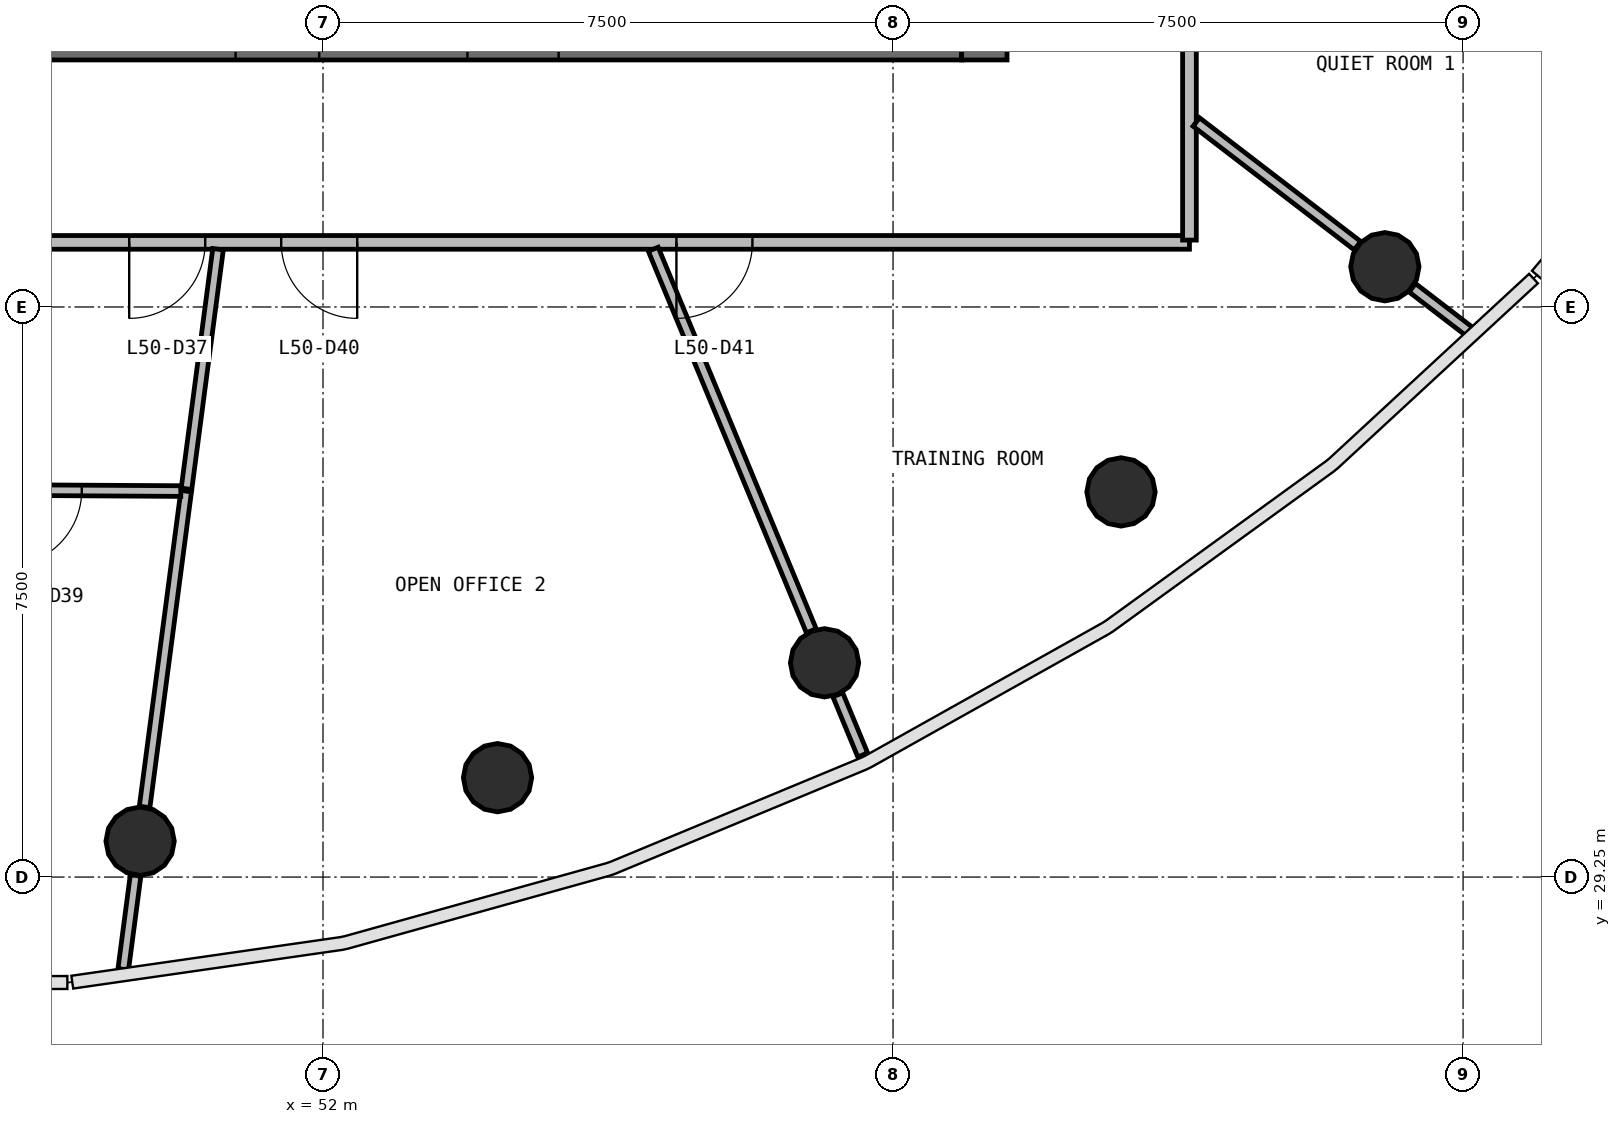
"""IFC4 building model, lengths in metres.
Left out: names, types, materials, properties, quantities, classifications, styles, units other than length and angle.
Written with IfcOpenShell. Run it as: python <this file> out.ifc"""

import sys

from ifc_helpers import new_model, si_unit, direction, frame, frame_2d, origin, origin_2d, place, context, subcontext, project, spatial, rectangle, circle, extrude, source, transform, mapped, element, fill, save


model = new_model("IFC4")
c1 = context("Model", 3, precision=1e-05, world=origin(), true_north=direction((0.0, 1.0)))
c2 = subcontext(c1, "Body", "Model", "MODEL_VIEW")
j1 = project(units=[si_unit("LENGTHUNIT", "METRE"), si_unit("PLANEANGLEUNIT", "RADIAN")], contexts=[c1])
p1 = place(None, origin())
s1 = spatial("IfcSite", under=j1, at=p1, CompositionType="ELEMENT")
p2 = place(p1, origin())
s2 = spatial("IfcBuilding", under=s1, at=p2, CompositionType="ELEMENT")
p3 = place(p2, frame((0.0, 0.0, 207.2)))
s3 = spatial("IfcBuildingStorey", under=s2, at=p3, CompositionType="ELEMENT", Elevation=207.2)
p4 = place(p3, frame((60.7, 40.0, 0.0), z_axis=(0.0, 0.0, 1.0), x_axis=(0.0, 1.0, 0.0)))
e1 = element("IfcWall", 1, at=p4, inside=s3, PredefinedType="SHEAR", context=c2, shape_type="SweptSolid", body=[
    extrude(rectangle(XDim=16.0, YDim=0.6, at=frame_2d((8.0, 0.0))), origin(), (0.0, 0.0, 1.0), 3.9),
])
p5 = place(p4, frame((7.1, 0.0, 0.0)))
e2 = element("IfcOpeningElement", 2, at=p5, cuts=e1, PredefinedType="OPENING", context=c2, shape_type="SweptSolid", body=[
    extrude(rectangle(XDim=1.8, YDim=2.1, at=frame_2d((0.9, 1.05))), frame((0.0, 0.31, 0.0), z_axis=(0.0, -1.0, 0.0), x_axis=(1.0, 0.0, 0.0)), (0.0, 0.0, 1.0), 0.62),
])
p6 = place(p3, frame((43.6, 40.3, 0.0), z_axis=(0.0, 0.0, 1.0), x_axis=(1.0, 0.0, 0.0)))
e3 = element("IfcWall", 3, at=p6, inside=s3, PredefinedType="SHEAR", context=c2, shape_type="SweptSolid", body=[
    extrude(rectangle(XDim=16.8, YDim=0.6, at=frame_2d((8.4, 0.0))), origin(), (0.0, 0.0, 1.0), 3.9),
])
p7 = place(p6, frame((10.3, 0.0, 0.0)))
e4 = element("IfcOpeningElement", 4, at=p7, cuts=e3, PredefinedType="OPENING", context=c2, shape_type="SweptSolid", body=[
    extrude(rectangle(XDim=1.2, YDim=2.1, at=frame_2d((0.6, 1.05))), frame((0.0, 0.31, 0.0), z_axis=(0.0, -1.0, 0.0), x_axis=(1.0, 0.0, 0.0)), (0.0, 0.0, 1.0), 0.62),
])
p8 = place(p6, frame((7.25, 0.0, 0.0)))
e5 = element("IfcOpeningElement", 5, at=p8, cuts=e3, PredefinedType="OPENING", context=c2, shape_type="SweptSolid", body=[
    extrude(rectangle(XDim=1.1, YDim=2.1, at=frame_2d((0.55, 1.05))), frame((0.0, 0.31, 0.0), z_axis=(0.0, -1.0, 0.0), x_axis=(1.0, 0.0, 0.0)), (0.0, 0.0, 1.0), 0.62),
])
p9 = place(p6, frame((0.7, 0.0, 0.0)))
e6 = element("IfcOpeningElement", 6, at=p9, cuts=e3, PredefinedType="OPENING", context=c2, shape_type="SweptSolid", body=[
    extrude(rectangle(XDim=0.8, YDim=2.1, at=frame_2d((0.4, 1.05))), frame((0.0, 0.31, 0.0), z_axis=(0.0, -1.0, 0.0), x_axis=(1.0, 0.0, 0.0)), (0.0, 0.0, 1.0), 0.62),
])
m1 = source(origin(), c2, "Body", "SweptSolid", [
    extrude(circle(Radius=0.45, at=origin_2d()), origin(), (0.0, 0.0, 1.0), 3.9),
])
for number, where, z_axis, x_axis in (
    (7, (49.594, 29.722, 0.0), (0.0, 0.0, 1.0), (1.0, 0.0, 0.0)),
    (8, (54.296, 30.558, 0.0), (0.0, 0.0, 1.0), (1.0, 0.0, 0.0)),
    (9, (58.599, 32.069, 0.0), (0.0, 0.0, 1.0), (1.0, 0.0, 0.0)),
    (10, (62.499, 34.317, 0.0), (0.0, 0.0, 1.0), (1.0, 0.0, 0.0)),
    (11, (65.971, 37.28, 0.0), (0.0, 0.0, 1.0), (1.0, 0.0, 0.0)),
):
    element("IfcColumn", number, at=place(p3, frame(where, z_axis=z_axis, x_axis=x_axis)), inside=s3, PredefinedType="COLUMN", context=c2, shape_type="MappedRepresentation", body=[
        mapped(m1, transform((0.0, 0.0, 0.0), scale=1.0)),
    ])
p10 = place(p3, frame((63.4, 37.6, 0.0), z_axis=(0.0, 0.0, 1.0), x_axis=(-1.0, 0.0, 0.0)))
e12 = element("IfcWall", 12, at=p10, inside=s3, PredefinedType="PARTITIONING", context=c2, shape_type="SweptSolid", body=[
    extrude(rectangle(XDim=22.8, YDim=0.18, at=frame_2d((11.4, 0.0))), origin(), (0.0, 0.0, 1.0), 2.88),
])
p11 = place(p10, frame((12.95, 0.0, 0.0)))
e13 = element("IfcOpeningElement", 13, at=p11, cuts=e12, PredefinedType="OPENING", context=c2, shape_type="SweptSolid", body=[
    extrude(rectangle(XDim=1.0, YDim=2.1, at=frame_2d((0.5, 1.05))), frame((0.0, 0.1, 0.0), z_axis=(0.0, -1.0, 0.0), x_axis=(1.0, 0.0, 0.0)), (0.0, 0.0, 1.0), 0.2),
])
p12 = place(p10, frame((10.95, 0.0, 0.0)))
e14 = element("IfcOpeningElement", 14, at=p12, cuts=e12, PredefinedType="OPENING", context=c2, shape_type="SweptSolid", body=[
    extrude(rectangle(XDim=1.0, YDim=2.1, at=frame_2d((0.5, 1.05))), frame((0.0, 0.1, 0.0), z_axis=(0.0, -1.0, 0.0), x_axis=(1.0, 0.0, 0.0)), (0.0, 0.0, 1.0), 0.2),
])
p13 = place(p10, frame((5.75, 0.0, 0.0)))
e15 = element("IfcOpeningElement", 15, at=p13, cuts=e12, PredefinedType="OPENING", context=c2, shape_type="SweptSolid", body=[
    extrude(rectangle(XDim=1.0, YDim=2.1, at=frame_2d((0.5, 1.05))), frame((0.0, 0.1, 0.0), z_axis=(0.0, -1.0, 0.0), x_axis=(1.0, 0.0, 0.0)), (0.0, 0.0, 1.0), 0.2),
])
p14 = place(p3, frame((63.4, 58.37, 0.0), z_axis=(0.0, 0.0, 1.0), x_axis=(0.0, -1.0, 0.0)))
e16 = element("IfcWall", 16, at=p14, inside=s3, PredefinedType="PARTITIONING", context=c2, shape_type="SweptSolid", body=[
    extrude(rectangle(XDim=20.74, YDim=0.18, at=frame_2d((10.37, 0.0))), origin(), (0.0, 0.0, 1.0), 2.88),
])
p15 = place(p14, frame((9.99, 0.0, 0.0)))
e17 = element("IfcOpeningElement", 17, at=p15, cuts=e16, PredefinedType="OPENING", context=c2, shape_type="SweptSolid", body=[
    extrude(rectangle(XDim=0.9, YDim=2.1, at=frame_2d((0.45, 1.05))), frame((0.0, 0.1, 0.0), z_axis=(0.0, -1.0, 0.0), x_axis=(1.0, 0.0, 0.0)), (0.0, 0.0, 1.0), 0.2),
])
p16 = place(p14, frame((7.79, 0.0, 0.0)))
e18 = element("IfcOpeningElement", 18, at=p16, cuts=e16, PredefinedType="OPENING", context=c2, shape_type="SweptSolid", body=[
    extrude(rectangle(XDim=0.9, YDim=2.1, at=frame_2d((0.45, 1.05))), frame((0.0, 0.1, 0.0), z_axis=(0.0, -1.0, 0.0), x_axis=(1.0, 0.0, 0.0)), (0.0, 0.0, 1.0), 0.2),
])
p17 = place(p14, frame((4.29, 0.0, 0.0)))
e19 = element("IfcOpeningElement", 19, at=p17, cuts=e16, PredefinedType="OPENING", context=c2, shape_type="SweptSolid", body=[
    extrude(rectangle(XDim=1.0, YDim=2.1, at=frame_2d((0.5, 1.05))), frame((0.0, 0.1, 0.0), z_axis=(0.0, -1.0, 0.0), x_axis=(1.0, 0.0, 0.0)), (0.0, 0.0, 1.0), 0.2),
])
p18 = place(p14, frame((15.49, 0.0, 0.0)))
e20 = element("IfcOpeningElement", 20, at=p18, cuts=e16, PredefinedType="OPENING", context=c2, shape_type="SweptSolid", body=[
    extrude(rectangle(XDim=1.0, YDim=2.1, at=frame_2d((0.5, 1.05))), frame((0.0, 0.1, 0.0), z_axis=(0.0, -1.0, 0.0), x_axis=(1.0, 0.0, 0.0)), (0.0, 0.0, 1.0), 0.2),
])
p19 = place(p14, frame((12.09, 0.0, 0.0)))
e21 = element("IfcOpeningElement", 21, at=p19, cuts=e16, PredefinedType="OPENING", context=c2, shape_type="SweptSolid", body=[
    extrude(rectangle(XDim=1.0, YDim=2.1, at=frame_2d((0.5, 1.05))), frame((0.0, 0.1, 0.0), z_axis=(0.0, -1.0, 0.0), x_axis=(1.0, 0.0, 0.0)), (0.0, 0.0, 1.0), 0.2),
])
p20 = place(p3, frame((56.345, 37.51, 0.0), z_axis=(0.0, 0.0, 1.0), x_axis=(0.382655972885, -0.923890906122, 0.0)))
e22 = element("IfcWall", 22, at=p20, inside=s3, PredefinedType="PARTITIONING", context=c2, shape_type="SweptSolid", body=[
    extrude(rectangle(XDim=5.435, YDim=0.14, at=frame_2d((2.717, 0.0))), origin(), (0.0, 0.0, 1.0), 2.88),
])
p21 = place(p3, frame((50.2, 34.328, 0.0), z_axis=(0.0, 0.0, 1.0), x_axis=(-0.130534370564, -0.99144378464, 0.0)))
e23 = element("IfcWall", 23, at=p21, inside=s3, PredefinedType="PARTITIONING", context=c2, shape_type="SweptSolid", body=[
    extrude(rectangle(XDim=4.191, YDim=0.14, at=frame_2d((2.096, 0.0))), origin(), (0.0, 0.0, 1.0), 2.88),
])
p22 = place(p3, frame((50.129, 34.328, 0.0), z_axis=(0.0, 0.0, 1.0), x_axis=(-0.999983244193, 0.005788897407, 0.0)))
e24 = element("IfcWall", 24, at=p22, inside=s3, PredefinedType="PARTITIONING", context=c2, shape_type="SweptSolid", body=[
    extrude(rectangle(XDim=3.753, YDim=0.14, at=frame_2d((1.877, 0.0))), origin(), (0.0, 0.0, 1.0), 2.88),
])
p23 = place(p22, frame((1.303, 0.0, 0.0)))
e25 = element("IfcOpeningElement", 25, at=p23, cuts=e24, PredefinedType="OPENING", context=c2, shape_type="SweptSolid", body=[
    extrude(rectangle(XDim=1.0, YDim=2.1, at=frame_2d((0.5, 1.05))), frame((0.0, 0.08, 0.0), z_axis=(0.0, -1.0, 0.0), x_axis=(1.0, 0.0, 0.0)), (0.0, 0.0, 1.0), 0.16),
])
p24 = place(p3, frame((50.619, 37.51, 0.0), z_axis=(0.0, 0.0, 1.0), x_axis=(-0.130524026108, -0.991445146546, 0.0)))
e26 = element("IfcWall", 26, at=p24, inside=s3, PredefinedType="PARTITIONING", context=c2, shape_type="SweptSolid", body=[
    extrude(rectangle(XDim=3.18, YDim=0.14, at=frame_2d((1.59, 0.0))), origin(), (0.0, 0.0, 1.0), 2.88),
])
p25 = place(p3, frame((63.49, 39.183, 0.0), z_axis=(0.0, 0.0, 1.0), x_axis=(0.793363703091, -0.608747923707, 0.0)))
e27 = element("IfcWall", 27, at=p25, inside=s3, PredefinedType="PARTITIONING", context=c2, shape_type="SweptSolid", body=[
    extrude(rectangle(XDim=2.673, YDim=0.14, at=frame_2d((1.336, 0.0))), origin(), (0.0, 0.0, 1.0), 2.88),
])
p26 = place(p3, frame((49.534, 29.271, 0.0), z_axis=(0.0, 0.0, 1.0), x_axis=(-0.130520415919, -0.991445621821, 0.0)))
e28 = element("IfcWall", 28, at=p26, inside=s3, PredefinedType="PARTITIONING", context=c2, shape_type="SweptSolid", body=[
    extrude(rectangle(XDim=1.246, YDim=0.14, at=frame_2d((0.623, 0.0))), origin(), (0.0, 0.0, 1.0), 2.88),
])
p27 = place(p3, frame((66.332, 37.003, 0.0), z_axis=(0.0, 0.0, 1.0), x_axis=(0.793344167197, -0.608773383431, 0.0)))
e29 = element("IfcWall", 29, at=p27, inside=s3, PredefinedType="PARTITIONING", context=c2, shape_type="SweptSolid", body=[
    extrude(rectangle(XDim=0.944, YDim=0.14, at=frame_2d((0.472, 0.0))), origin(), (0.0, 0.0, 1.0), 2.88),
])
p28 = place(p3, frame((58.773, 31.648, 0.0), z_axis=(0.0, 0.0, 1.0), x_axis=(0.382754217383, -0.92385020922, 0.0)))
e30 = element("IfcWall", 30, at=p28, inside=s3, PredefinedType="PARTITIONING", context=c2, shape_type="SweptSolid", body=[
    extrude(rectangle(XDim=0.857, YDim=0.14, at=frame_2d((0.429, 0.0))), origin(), (0.0, 0.0, 1.0), 2.88),
])
m2 = source(origin(), c2, "Body", "SweptSolid", [
    extrude(rectangle(XDim=1.0, YDim=2.1, at=frame_2d((0.5, 1.05))), frame((0.0, 0.025, 0.0), z_axis=(0.0, -1.0, 0.0), x_axis=(1.0, 0.0, 0.0)), (0.0, 0.0, 1.0), 0.05),
])
p29 = place(p11, origin())
e31 = element("IfcDoor", 31, at=p29, inside=s3, OperationType="SINGLE_SWING_RIGHT", PredefinedType="DOOR", context=c2, shape_type="MappedRepresentation", body=[
    mapped(m2, transform((0.0, 0.0, 0.0), scale=1.0)),
])
fill(e13, e31)
p30 = place(p23, origin())
e32 = element("IfcDoor", 32, at=p30, inside=s3, OperationType="SINGLE_SWING_RIGHT", PredefinedType="DOOR", context=c2, shape_type="MappedRepresentation", body=[
    mapped(m2, transform((0.0, 0.0, 0.0), scale=1.0)),
])
fill(e25, e32)
p31 = place(p12, origin())
e33 = element("IfcDoor", 33, at=p31, inside=s3, OperationType="SINGLE_SWING_LEFT", PredefinedType="DOOR", context=c2, shape_type="MappedRepresentation", body=[
    mapped(m2, transform((0.0, 0.0, 0.0), scale=1.0)),
])
fill(e14, e33)
p32 = place(p13, origin())
e34 = element("IfcDoor", 34, at=p32, inside=s3, OperationType="SINGLE_SWING_RIGHT", PredefinedType="DOOR", context=c2, shape_type="MappedRepresentation", body=[
    mapped(m2, transform((0.0, 0.0, 0.0), scale=1.0)),
])
fill(e15, e34)
save(model, sys.argv[1])
